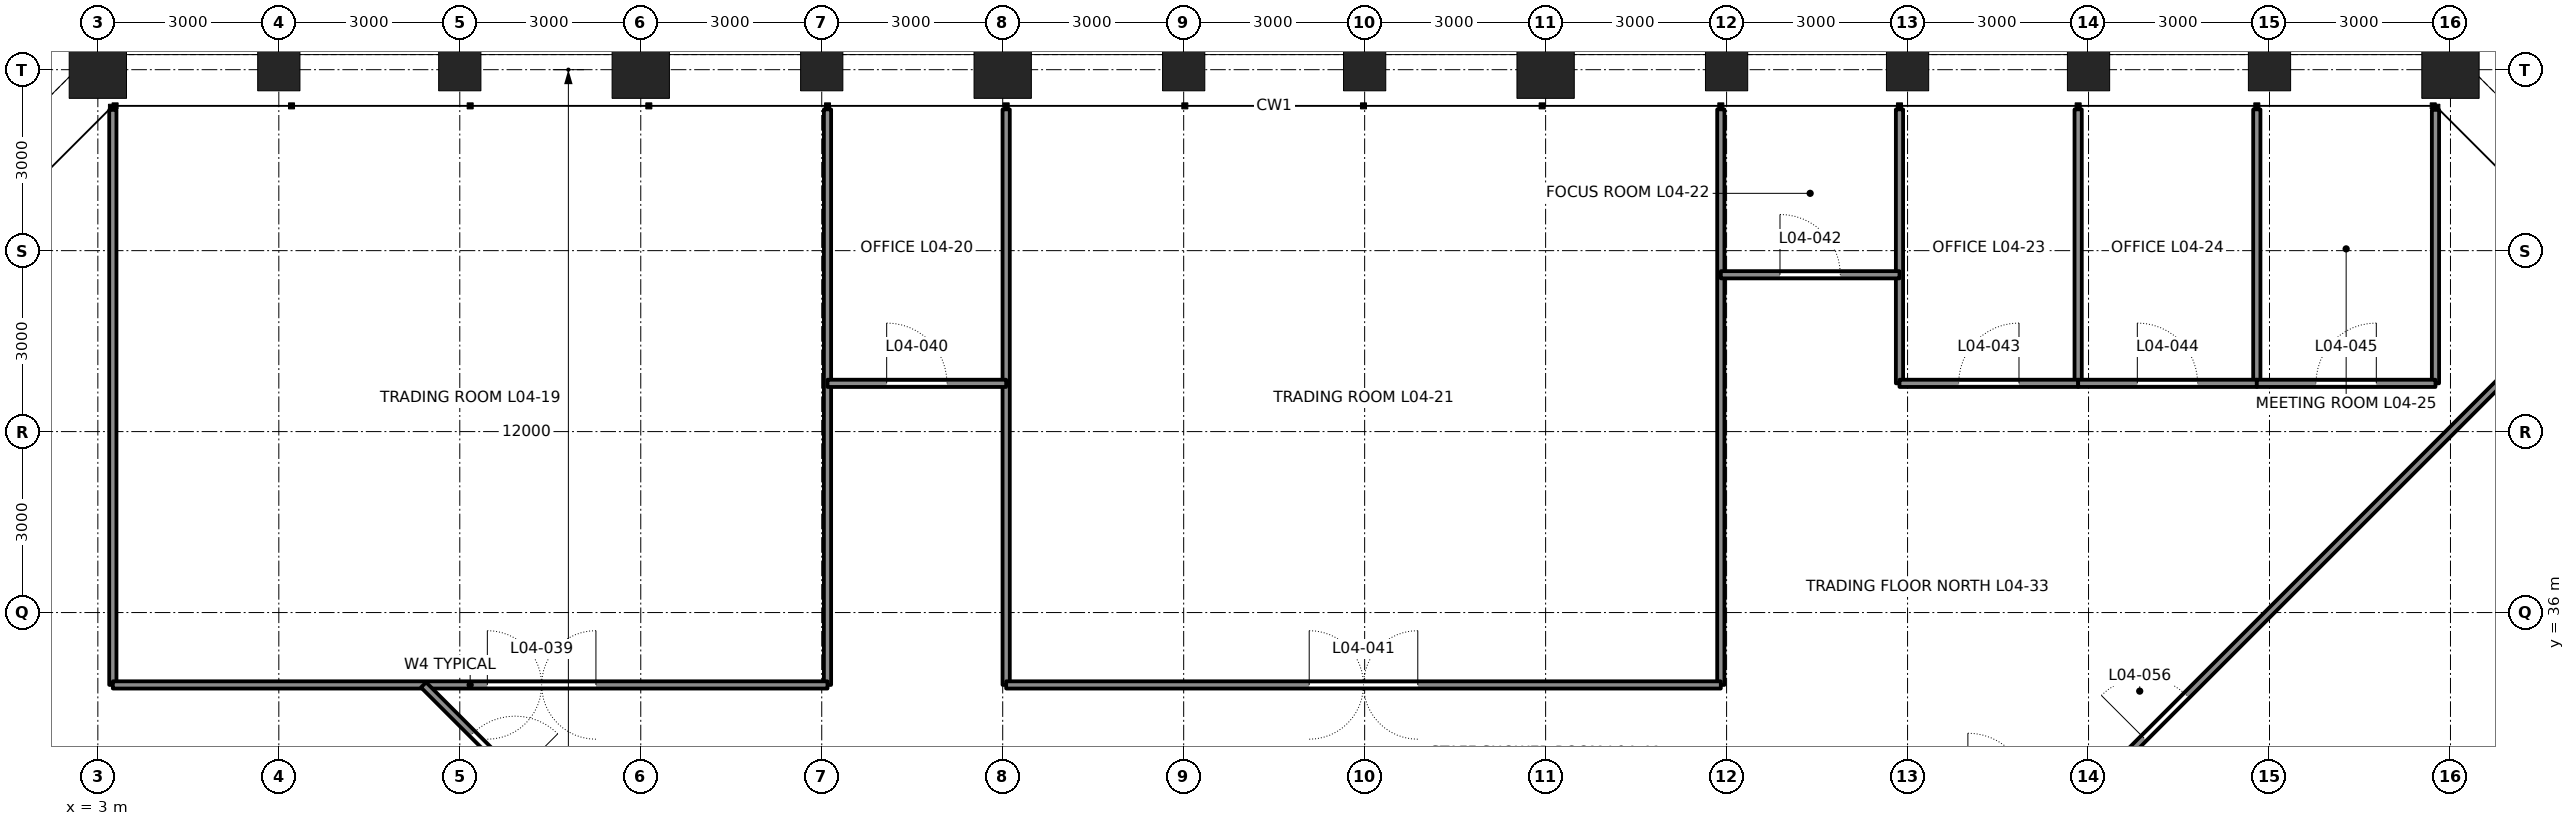
"""IFC4 building model, lengths in metres.
Left out: names, types, materials, properties, quantities, classifications, styles, units other than length and angle.
Written with IfcOpenShell. Run it as: python <this file> out.ifc"""

import sys

from ifc_helpers import new_model, si_unit, direction, frame, frame_2d, origin, origin_2d, place, context, subcontext, project, spatial, rectangle, hollow_rectangle, extrude, element, fill, save


model = new_model("IFC4")
c1 = context("Model", 3, precision=1e-05, world=origin(), true_north=direction((0.0, 1.0)))
c2 = subcontext(c1, "Body", "Model", "MODEL_VIEW")
j1 = project(units=[si_unit("LENGTHUNIT", "METRE"), si_unit("PLANEANGLEUNIT", "RADIAN")], contexts=[c1])
p1 = place(None, origin())
s1 = spatial("IfcSite", under=j1, at=p1, CompositionType="ELEMENT")
p2 = place(p1, origin())
s2 = spatial("IfcBuilding", under=s1, at=p2, CompositionType="ELEMENT")
p3 = place(p2, frame((0.0, 0.0, 24.3)))
s3 = spatial("IfcBuildingStorey", under=s2, at=p3, CompositionType="ELEMENT", Elevation=24.3)
p4 = place(p3, frame((42.0, 45.0, 0.0), z_axis=(0.0, 0.0, 1.0), x_axis=(0.0, 1.0, 0.0)))
e1 = element("IfcColumn", 1, at=p4, inside=s3, PredefinedType="COLUMN", context=c2, shape_type="SweptSolid", body=[
    extrude(hollow_rectangle(XDim=0.95, YDim=0.95, WallThickness=0.095, at=origin_2d()), origin(), (0.0, 0.0, 1.0), 4.5),
])
for number, where, z_axis, x_axis in (
    (2, (39.0, 45.0, 0.0), (0.0, 0.0, 1.0), (0.0, 1.0, 0.0)),
    (3, (36.0, 45.0, 0.0), (0.0, 0.0, 1.0), (0.0, 1.0, 0.0)),
    (4, (33.0, 45.0, 0.0), (0.0, 0.0, 1.0), (0.0, 1.0, 0.0)),
    (5, (30.0, 45.0, 0.0), (0.0, 0.0, 1.0), (0.0, 1.0, 0.0)),
):
    element("IfcColumn", number, at=place(p3, frame(where, z_axis=z_axis, x_axis=x_axis)), inside=s3, PredefinedType="COLUMN", context=c2, shape_type="SweptSolid", body=[
        extrude(hollow_rectangle(XDim=0.7, YDim=0.7, WallThickness=0.07, at=origin_2d()), origin(), (0.0, 0.0, 1.0), 4.5),
    ])
p5 = place(p3, frame((27.0, 45.0, 0.0), z_axis=(0.0, 0.0, 1.0), x_axis=(0.0, 1.0, 0.0)))
e6 = element("IfcColumn", 6, at=p5, inside=s3, PredefinedType="COLUMN", context=c2, shape_type="SweptSolid", body=[
    extrude(hollow_rectangle(XDim=0.95, YDim=0.95, WallThickness=0.11, at=origin_2d()), origin(), (0.0, 0.0, 1.0), 4.5),
])
for number, where, z_axis, x_axis in (
    (7, (24.0, 45.0, 0.0), (0.0, 0.0, 1.0), (0.0, 1.0, 0.0)),
    (8, (21.0, 45.0, 0.0), (0.0, 0.0, 1.0), (0.0, 1.0, 0.0)),
):
    element("IfcColumn", number, at=place(p3, frame(where, z_axis=z_axis, x_axis=x_axis)), inside=s3, PredefinedType="COLUMN", context=c2, shape_type="SweptSolid", body=[
        extrude(hollow_rectangle(XDim=0.7, YDim=0.7, WallThickness=0.07, at=origin_2d()), origin(), (0.0, 0.0, 1.0), 4.5),
    ])
p6 = place(p3, frame((18.0, 45.0, 0.0), z_axis=(0.0, 0.0, 1.0), x_axis=(0.0, 1.0, 0.0)))
e9 = element("IfcColumn", 9, at=p6, inside=s3, PredefinedType="COLUMN", context=c2, shape_type="SweptSolid", body=[
    extrude(hollow_rectangle(XDim=0.95, YDim=0.95, WallThickness=0.11, at=origin_2d()), origin(), (0.0, 0.0, 1.0), 4.5),
])
p7 = place(p3, frame((15.0, 45.0, 0.0), z_axis=(0.0, 0.0, 1.0), x_axis=(0.0, 1.0, 0.0)))
e10 = element("IfcColumn", 10, at=p7, inside=s3, PredefinedType="COLUMN", context=c2, shape_type="SweptSolid", body=[
    extrude(hollow_rectangle(XDim=0.7, YDim=0.7, WallThickness=0.07, at=origin_2d()), origin(), (0.0, 0.0, 1.0), 4.5),
])
p8 = place(p3, frame((12.0, 45.0, 0.0), z_axis=(0.0, 0.0, 1.0), x_axis=(0.0, 1.0, 0.0)))
e11 = element("IfcColumn", 11, at=p8, inside=s3, PredefinedType="COLUMN", context=c2, shape_type="SweptSolid", body=[
    extrude(hollow_rectangle(XDim=0.95, YDim=0.95, WallThickness=0.11, at=origin_2d()), origin(), (0.0, 0.0, 1.0), 4.5),
])
for number, where, z_axis, x_axis in (
    (12, (9.0, 45.0, 0.0), (0.0, 0.0, 1.0), (0.0, 1.0, 0.0)),
    (13, (6.0, 45.0, 0.0), (0.0, 0.0, 1.0), (0.0, 1.0, 0.0)),
):
    element("IfcColumn", number, at=place(p3, frame(where, z_axis=z_axis, x_axis=x_axis)), inside=s3, PredefinedType="COLUMN", context=c2, shape_type="SweptSolid", body=[
        extrude(hollow_rectangle(XDim=0.7, YDim=0.7, WallThickness=0.07, at=origin_2d()), origin(), (0.0, 0.0, 1.0), 4.5),
    ])
p9 = place(p3, frame((3.0, 45.0, 0.0), z_axis=(0.0, 0.0, 1.0), x_axis=(0.0, 1.0, 0.0)))
e14 = element("IfcColumn", 14, at=p9, inside=s3, PredefinedType="COLUMN", context=c2, shape_type="SweptSolid", body=[
    extrude(hollow_rectangle(XDim=0.95, YDim=0.95, WallThickness=0.095, at=origin_2d()), origin(), (0.0, 0.0, 1.0), 4.5),
])
p10 = place(p3, frame((3.249, 44.334, -0.3), z_axis=(0.0, 0.0, 1.0), x_axis=(0.0, -1.0, 0.0)))
e15 = element("IfcWall", 15, at=p10, inside=s3, PredefinedType="PARTITIONING", context=c2, shape_type="SweptSolid", body=[
    extrude(rectangle(XDim=9.534, YDim=0.12, at=frame_2d((4.767, 0.0))), origin(), (0.0, 0.0, 1.0), 4.34),
])
for number, where, z_axis, x_axis in (
    (16, (15.096, 44.343, -0.3), (0.0, 0.0, 1.0), (0.0, -1.0, 0.0)),
    (17, (18.057, 44.343, -0.3), (0.0, 0.0, 1.0), (0.0, -1.0, 0.0)),
    (18, (29.904, 44.343, -0.3), (0.0, 0.0, 1.0), (0.0, -1.0, 0.0)),
):
    element("IfcWall", number, at=place(p3, frame(where, z_axis=z_axis, x_axis=x_axis)), inside=s3, PredefinedType="PARTITIONING", context=c2, shape_type="SweptSolid", body=[
        extrude(rectangle(XDim=9.542, YDim=0.12, at=frame_2d((4.771, 0.0))), origin(), (0.0, 0.0, 1.0), 3.646),
    ])
p11 = place(p3, frame((32.866, 44.343, -0.3), z_axis=(0.0, 0.0, 1.0), x_axis=(0.0, -1.0, 0.0)))
e19 = element("IfcWall", 19, at=p11, inside=s3, PredefinedType="PARTITIONING", context=c2, shape_type="SweptSolid", body=[
    extrude(rectangle(XDim=4.542, YDim=0.12, at=frame_2d((2.271, 0.0))), origin(), (0.0, 0.0, 1.0), 3.481),
])
for number, where, z_axis, x_axis in (
    (20, (35.828, 44.343, -0.3), (0.0, 0.0, 1.0), (0.0, -1.0, 0.0)),
    (21, (38.79, 44.343, -0.3), (0.0, 0.0, 1.0), (0.0, -1.0, 0.0)),
):
    element("IfcWall", number, at=place(p3, frame(where, z_axis=z_axis, x_axis=x_axis)), inside=s3, PredefinedType="PARTITIONING", context=c2, shape_type="SweptSolid", body=[
        extrude(rectangle(XDim=4.542, YDim=0.12, at=frame_2d((2.271, 0.0))), origin(), (0.0, 0.0, 1.0), 4.34),
    ])
p12 = place(p3, frame((41.751, 44.334, -0.3), z_axis=(0.0, 0.0, 1.0), x_axis=(0.0, -1.0, 0.0)))
e22 = element("IfcWall", 22, at=p12, inside=s3, PredefinedType="PARTITIONING", context=c2, shape_type="SweptSolid", body=[
    extrude(rectangle(XDim=4.534, YDim=0.12, at=frame_2d((2.267, 0.0))), origin(), (0.0, 0.0, 1.0), 4.34),
])
p13 = place(p3, frame((3.249, 34.8, -0.3), z_axis=(0.0, 0.0, 1.0), x_axis=(1.0, 0.0, 0.0)))
e23 = element("IfcWall", 23, at=p13, inside=s3, PredefinedType="PARTITIONING", context=c2, shape_type="SweptSolid", body=[
    extrude(rectangle(XDim=11.847, YDim=0.12, at=frame_2d((5.924, 0.0))), origin(), (0.0, 0.0, 1.0), 4.34),
])
p14 = place(p13, frame((6.208, 0.0, 0.3)))
e24 = element("IfcOpeningElement", 24, at=p14, cuts=e23, PredefinedType="OPENING", context=c2, shape_type="SweptSolid", body=[
    extrude(rectangle(XDim=1.8, YDim=2.4, at=frame_2d((0.9, 1.2))), frame((0.0, 0.07, 0.0), z_axis=(0.0, -1.0, 0.0), x_axis=(1.0, 0.0, 0.0)), (0.0, 0.0, 1.0), 0.14),
])
p15 = place(p3, frame((15.096, 39.8, -0.3), z_axis=(0.0, 0.0, 1.0), x_axis=(1.0, 0.0, 0.0)))
e25 = element("IfcWall", 25, at=p15, inside=s3, PredefinedType="PARTITIONING", context=c2, shape_type="SweptSolid", body=[
    extrude(rectangle(XDim=2.962, YDim=0.12, at=frame_2d((1.481, 0.0))), origin(), (0.0, 0.0, 1.0), 4.34),
])
p16 = place(p15, frame((0.981, 0.0, 0.3)))
e26 = element("IfcOpeningElement", 26, at=p16, cuts=e25, PredefinedType="OPENING", context=c2, shape_type="SweptSolid", body=[
    extrude(rectangle(XDim=1.0, YDim=2.4, at=frame_2d((0.5, 1.2))), frame((0.0, 0.07, 0.0), z_axis=(0.0, -1.0, 0.0), x_axis=(1.0, 0.0, 0.0)), (0.0, 0.0, 1.0), 0.14),
])
p17 = place(p3, frame((18.057, 34.8, -0.3), z_axis=(0.0, 0.0, 1.0), x_axis=(1.0, 0.0, 0.0)))
e27 = element("IfcWall", 27, at=p17, inside=s3, PredefinedType="PARTITIONING", context=c2, shape_type="SweptSolid", body=[
    extrude(rectangle(XDim=11.847, YDim=0.12, at=frame_2d((5.923, 0.0))), origin(), (0.0, 0.0, 1.0), 4.34),
])
p18 = place(p17, frame((5.023, 0.0, 0.3)))
e28 = element("IfcOpeningElement", 28, at=p18, cuts=e27, PredefinedType="OPENING", context=c2, shape_type="SweptSolid", body=[
    extrude(rectangle(XDim=1.8, YDim=2.4, at=frame_2d((0.9, 1.2))), frame((0.0, 0.07, 0.0), z_axis=(0.0, -1.0, 0.0), x_axis=(1.0, 0.0, 0.0)), (0.0, 0.0, 1.0), 0.14),
])
p19 = place(p3, frame((29.904, 41.6, -0.3), z_axis=(0.0, 0.0, 1.0), x_axis=(1.0, 0.0, 0.0)))
e29 = element("IfcWall", 29, at=p19, inside=s3, PredefinedType="PARTITIONING", context=c2, shape_type="SweptSolid", body=[
    extrude(rectangle(XDim=2.962, YDim=0.12, at=frame_2d((1.481, 0.0))), origin(), (0.0, 0.0, 1.0), 4.34),
])
p20 = place(p19, frame((0.981, 0.0, 0.3)))
e30 = element("IfcOpeningElement", 30, at=p20, cuts=e29, PredefinedType="OPENING", context=c2, shape_type="SweptSolid", body=[
    extrude(rectangle(XDim=1.0, YDim=2.4, at=frame_2d((0.5, 1.2))), frame((0.0, 0.07, 0.0), z_axis=(0.0, -1.0, 0.0), x_axis=(1.0, 0.0, 0.0)), (0.0, 0.0, 1.0), 0.14),
])
p21 = place(p3, frame((32.866, 39.8, -0.3), z_axis=(0.0, 0.0, 1.0), x_axis=(1.0, 0.0, 0.0)))
e31 = element("IfcWall", 31, at=p21, inside=s3, PredefinedType="PARTITIONING", context=c2, shape_type="SweptSolid", body=[
    extrude(rectangle(XDim=2.962, YDim=0.12, at=frame_2d((1.481, 0.0))), origin(), (0.0, 0.0, 1.0), 4.34),
])
p22 = place(p21, frame((0.981, 0.0, 0.3)))
e32 = element("IfcOpeningElement", 32, at=p22, cuts=e31, PredefinedType="OPENING", context=c2, shape_type="SweptSolid", body=[
    extrude(rectangle(XDim=1.0, YDim=2.4, at=frame_2d((0.5, 1.2))), frame((0.0, 0.07, 0.0), z_axis=(0.0, -1.0, 0.0), x_axis=(1.0, 0.0, 0.0)), (0.0, 0.0, 1.0), 0.14),
])
p23 = place(p3, frame((35.828, 39.8, -0.3), z_axis=(0.0, 0.0, 1.0), x_axis=(1.0, 0.0, 0.0)))
e33 = element("IfcWall", 33, at=p23, inside=s3, PredefinedType="PARTITIONING", context=c2, shape_type="SweptSolid", body=[
    extrude(rectangle(XDim=2.962, YDim=0.12, at=frame_2d((1.481, 0.0))), origin(), (0.0, 0.0, 1.0), 4.34),
])
p24 = place(p23, frame((0.981, 0.0, 0.3)))
e34 = element("IfcOpeningElement", 34, at=p24, cuts=e33, PredefinedType="OPENING", context=c2, shape_type="SweptSolid", body=[
    extrude(rectangle(XDim=1.0, YDim=2.4, at=frame_2d((0.5, 1.2))), frame((0.0, 0.07, 0.0), z_axis=(0.0, -1.0, 0.0), x_axis=(1.0, 0.0, 0.0)), (0.0, 0.0, 1.0), 0.14),
])
p25 = place(p3, frame((38.79, 39.8, -0.3), z_axis=(0.0, 0.0, 1.0), x_axis=(1.0, 0.0, 0.0)))
e35 = element("IfcWall", 35, at=p25, inside=s3, PredefinedType="PARTITIONING", context=c2, shape_type="SweptSolid", body=[
    extrude(rectangle(XDim=2.962, YDim=0.12, at=frame_2d((1.481, 0.0))), origin(), (0.0, 0.0, 1.0), 4.34),
])
p26 = place(p25, frame((0.981, 0.0, 0.3)))
e36 = element("IfcOpeningElement", 36, at=p26, cuts=e35, PredefinedType="OPENING", context=c2, shape_type="SweptSolid", body=[
    extrude(rectangle(XDim=1.0, YDim=2.4, at=frame_2d((0.5, 1.2))), frame((0.0, 0.07, 0.0), z_axis=(0.0, -1.0, 0.0), x_axis=(1.0, 0.0, 0.0)), (0.0, 0.0, 1.0), 0.14),
])
p27 = place(p3, frame((36.0, 33.0, -0.3), z_axis=(0.0, 0.0, 1.0), x_axis=(0.707106781187, 0.707106781187, 0.0)))
e37 = element("IfcWall", 37, at=p27, inside=s3, PredefinedType="PARTITIONING", context=c2, shape_type="SweptSolid", body=[
    extrude(rectangle(XDim=11.842, YDim=0.12, at=frame_2d((5.921, 0.0))), origin(), (0.0, 0.0, 1.0), 4.34),
])
p28 = place(p27, frame((1.3, 0.0, 0.3)))
e38 = element("IfcOpeningElement", 38, at=p28, cuts=e37, PredefinedType="OPENING", context=c2, shape_type="SweptSolid", body=[
    extrude(rectangle(XDim=1.0, YDim=2.4, at=frame_2d((0.5, 1.2))), frame((0.0, 0.07, 0.0), z_axis=(0.0, -1.0, 0.0), x_axis=(1.0, 0.0, 0.0)), (0.0, 0.0, 1.0), 0.14),
])
p29 = place(p3, frame((10.2, 33.0, -0.3), z_axis=(0.0, 0.0, 1.0), x_axis=(-0.707106781187, 0.707106781187, 0.0)))
e39 = element("IfcWall", 39, at=p29, inside=s3, PredefinedType="PARTITIONING", context=c2, shape_type="SweptSolid", body=[
    extrude(rectangle(XDim=2.547, YDim=0.12, at=frame_2d((1.273, 0.0))), origin(), (0.0, 0.0, 1.0), 4.34),
])
p30 = place(p29, frame((0.4, 0.0, 0.3)))
e40 = element("IfcOpeningElement", 40, at=p30, cuts=e39, PredefinedType="OPENING", context=c2, shape_type="SweptSolid", body=[
    extrude(rectangle(XDim=1.0, YDim=2.4, at=frame_2d((0.5, 1.2))), frame((0.0, 0.07, 0.0), z_axis=(0.0, -1.0, 0.0), x_axis=(1.0, 0.0, 0.0)), (0.0, 0.0, 1.0), 0.14),
])
p31 = place(p14, origin())
e41 = element("IfcDoor", 41, at=p31, inside=s3, OperationType="DOUBLE_DOOR_DOUBLE_SWING", PredefinedType="DOOR", context=c2, shape_type="SweptSolid", body=[
    extrude(rectangle(XDim=1.8, YDim=2.4, at=frame_2d((0.9, 1.2))), frame((0.0, 0.025, 0.0), z_axis=(0.0, -1.0, 0.0), x_axis=(1.0, 0.0, 0.0)), (0.0, 0.0, 1.0), 0.05),
])
fill(e24, e41)
p32 = place(p16, origin())
e42 = element("IfcDoor", 42, at=p32, inside=s3, OperationType="SINGLE_SWING_LEFT", PredefinedType="DOOR", context=c2, shape_type="SweptSolid", body=[
    extrude(rectangle(XDim=1.0, YDim=2.4, at=frame_2d((0.5, 1.2))), frame((0.0, 0.025, 0.0), z_axis=(0.0, -1.0, 0.0), x_axis=(1.0, 0.0, 0.0)), (0.0, 0.0, 1.0), 0.05),
])
fill(e26, e42)
p33 = place(p18, origin())
e43 = element("IfcDoor", 43, at=p33, inside=s3, OperationType="DOUBLE_DOOR_DOUBLE_SWING", PredefinedType="DOOR", context=c2, shape_type="SweptSolid", body=[
    extrude(rectangle(XDim=1.8, YDim=2.4, at=frame_2d((0.9, 1.2))), frame((0.0, 0.025, 0.0), z_axis=(0.0, -1.0, 0.0), x_axis=(1.0, 0.0, 0.0)), (0.0, 0.0, 1.0), 0.05),
])
fill(e28, e43)
p34 = place(p20, origin())
e44 = element("IfcDoor", 44, at=p34, inside=s3, OperationType="SINGLE_SWING_LEFT", PredefinedType="DOOR", context=c2, shape_type="SweptSolid", body=[
    extrude(rectangle(XDim=1.0, YDim=2.4, at=frame_2d((0.5, 1.2))), frame((0.0, 0.025, 0.0), z_axis=(0.0, -1.0, 0.0), x_axis=(1.0, 0.0, 0.0)), (0.0, 0.0, 1.0), 0.05),
])
fill(e30, e44)
p35 = place(p22, origin())
e45 = element("IfcDoor", 45, at=p35, inside=s3, OperationType="SINGLE_SWING_RIGHT", PredefinedType="DOOR", context=c2, shape_type="SweptSolid", body=[
    extrude(rectangle(XDim=1.0, YDim=2.4, at=frame_2d((0.5, 1.2))), frame((0.0, 0.025, 0.0), z_axis=(0.0, -1.0, 0.0), x_axis=(1.0, 0.0, 0.0)), (0.0, 0.0, 1.0), 0.05),
])
fill(e32, e45)
p36 = place(p24, origin())
e46 = element("IfcDoor", 46, at=p36, inside=s3, OperationType="SINGLE_SWING_LEFT", PredefinedType="DOOR", context=c2, shape_type="SweptSolid", body=[
    extrude(rectangle(XDim=1.0, YDim=2.4, at=frame_2d((0.5, 1.2))), frame((0.0, 0.025, 0.0), z_axis=(0.0, -1.0, 0.0), x_axis=(1.0, 0.0, 0.0)), (0.0, 0.0, 1.0), 0.05),
])
fill(e34, e46)
p37 = place(p26, origin())
e47 = element("IfcDoor", 47, at=p37, inside=s3, OperationType="SINGLE_SWING_RIGHT", PredefinedType="DOOR", context=c2, shape_type="SweptSolid", body=[
    extrude(rectangle(XDim=1.0, YDim=2.4, at=frame_2d((0.5, 1.2))), frame((0.0, 0.025, 0.0), z_axis=(0.0, -1.0, 0.0), x_axis=(1.0, 0.0, 0.0)), (0.0, 0.0, 1.0), 0.05),
])
fill(e36, e47)
p38 = place(p28, origin())
e48 = element("IfcDoor", 48, at=p38, inside=s3, OperationType="SINGLE_SWING_LEFT", PredefinedType="DOOR", context=c2, shape_type="SweptSolid", body=[
    extrude(rectangle(XDim=1.0, YDim=2.4, at=frame_2d((0.5, 1.2))), frame((0.0, 0.025, 0.0), z_axis=(0.0, -1.0, 0.0), x_axis=(1.0, 0.0, 0.0)), (0.0, 0.0, 1.0), 0.05),
])
fill(e38, e48)
p39 = place(p30, frame((1.0, 0.0, 0.0), z_axis=(0.0, 0.0, 1.0), x_axis=(-1.0, 0.0, 0.0)))
e49 = element("IfcDoor", 49, at=p39, inside=s3, OperationType="SINGLE_SWING_RIGHT", PredefinedType="DOOR", context=c2, shape_type="SweptSolid", body=[
    extrude(rectangle(XDim=1.0, YDim=2.4, at=frame_2d((0.5, 1.2))), frame((0.0, 0.025, 0.0), z_axis=(0.0, -1.0, 0.0), x_axis=(1.0, 0.0, 0.0)), (0.0, 0.0, 1.0), 0.05),
])
fill(e40, e49)
save(model, sys.argv[1])
